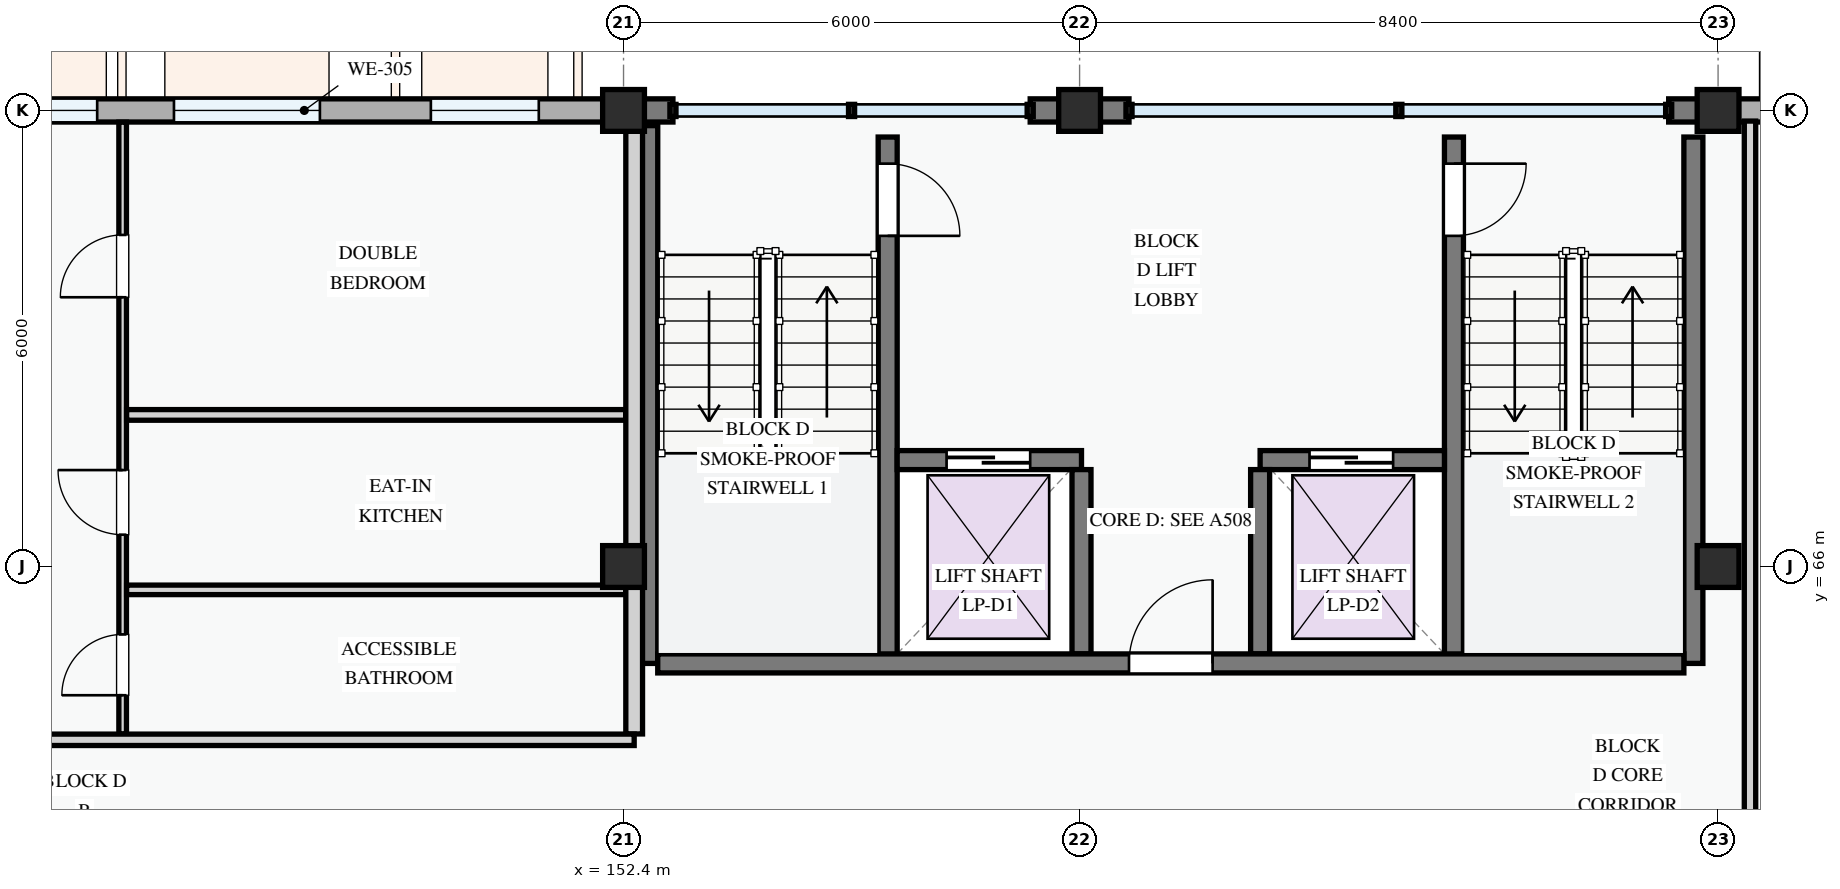
"""IFC4 building model, lengths in metres.
Left out: names, types, materials, properties, quantities, classifications, styles, units other than length and angle.
Written with IfcOpenShell. Run it as: python <this file> out.ifc"""

import sys

from ifc_helpers import new_model, si_unit, direction, frame, frame_2d, origin, origin_2d, place, context, subcontext, project, spatial, rectangle, extrude, element, fill, save


model = new_model("IFC4")
c1 = context("Model", 3, precision=1e-05, world=origin(), true_north=direction((0.0, 1.0)))
c2 = subcontext(c1, "Body", "Model", "MODEL_VIEW")
j1 = project(units=[si_unit("LENGTHUNIT", "METRE"), si_unit("PLANEANGLEUNIT", "RADIAN")], contexts=[c1])
p1 = place(None, origin())
s1 = spatial("IfcSite", under=j1, at=p1, CompositionType="ELEMENT")
p2 = place(p1, origin())
s2 = spatial("IfcBuilding", under=s1, at=p2, CompositionType="ELEMENT")
p3 = place(p2, frame((0.0, 0.0, 14.7)))
s3 = spatial("IfcBuildingStorey", under=s2, at=p3, CompositionType="ELEMENT", Elevation=14.7)
for number, where, z_axis, x_axis in (
    (1, (152.4, 66.0, 0.0), (0.0, 0.0, 1.0), (1.0, 0.0, 0.0)),
    (2, (152.4, 72.0, 0.0), (0.0, 0.0, 1.0), (1.0, 0.0, 0.0)),
    (3, (158.4, 72.0, 0.0), (0.0, 0.0, 1.0), (1.0, 0.0, 0.0)),
    (4, (166.8, 66.0, 0.0), (0.0, 0.0, 1.0), (1.0, 0.0, 0.0)),
    (5, (166.8, 72.0, 0.0), (0.0, 0.0, 1.0), (1.0, 0.0, 0.0)),
):
    element("IfcColumn", number, at=place(p3, frame(where, z_axis=z_axis, x_axis=x_axis)), inside=s3, PredefinedType="COLUMN", context=c2, shape_type="SweptSolid", body=[
        extrude(rectangle(XDim=0.55, YDim=0.55, at=origin_2d()), origin(), (0.0, 0.0, 1.0), 3.3),
    ])
p4 = place(p3, frame((152.4, 72.0, 0.0), z_axis=(0.0, 0.0, 1.0), x_axis=(-1.0, 0.0, 0.0)))
e6 = element("IfcWall", 6, at=p4, inside=s3, PredefinedType="STANDARD", context=c2, shape_type="SweptSolid", body=[
    extrude(rectangle(XDim=8.4, YDim=0.305, at=frame_2d((4.2, 0.0))), origin(), (0.0, 0.0, 1.0), 2.375),
])
p5 = place(p4, frame((1.115, 0.0, 0.78)))
e7 = element("IfcOpeningElement", 7, at=p5, cuts=e6, PredefinedType="OPENING", context=c2, shape_type="SweptSolid", body=[
    extrude(rectangle(XDim=1.42, YDim=1.38, at=frame_2d((0.71, 0.69))), frame((0.0, 0.163, 0.0), z_axis=(0.0, -1.0, 0.0), x_axis=(1.0, 0.0, 0.0)), (0.0, 0.0, 1.0), 0.325),
])
p6 = place(p4, frame((3.995, 0.0, 0.78)))
e8 = element("IfcOpeningElement", 8, at=p6, cuts=e6, PredefinedType="OPENING", context=c2, shape_type="SweptSolid", body=[
    extrude(rectangle(XDim=1.92, YDim=1.44, at=frame_2d((0.96, 0.72))), frame((0.0, 0.163, 0.0), z_axis=(0.0, -1.0, 0.0), x_axis=(1.0, 0.0, 0.0)), (0.0, 0.0, 1.0), 0.325),
])
p7 = place(p4, frame((6.925, 0.0, 0.78)))
e9 = element("IfcOpeningElement", 9, at=p7, cuts=e6, PredefinedType="OPENING", context=c2, shape_type="SweptSolid", body=[
    extrude(rectangle(XDim=0.95, YDim=1.15, at=frame_2d((0.475, 0.575))), frame((0.0, 0.163, 0.0), z_axis=(0.0, -1.0, 0.0), x_axis=(1.0, 0.0, 0.0)), (0.0, 0.0, 1.0), 0.325),
])
p8 = place(p3, frame((174.0, 72.0, 0.0), z_axis=(0.0, 0.0, 1.0), x_axis=(-1.0, 0.0, 0.0)))
e10 = element("IfcWall", 10, at=p8, inside=s3, PredefinedType="STANDARD", context=c2, shape_type="SweptSolid", body=[
    extrude(rectangle(XDim=7.2, YDim=0.305, at=frame_2d((3.6, 0.0))), origin(), (0.0, 0.0, 1.0), 2.375),
])
p9 = place(p8, frame((1.323, 0.0, 0.78)))
e11 = element("IfcOpeningElement", 11, at=p9, cuts=e10, PredefinedType="OPENING", context=c2, shape_type="SweptSolid", body=[
    extrude(rectangle(XDim=1.1, YDim=1.3, at=frame_2d((0.55, 0.65))), frame((0.0, 0.163, 0.0), z_axis=(0.0, -1.0, 0.0), x_axis=(1.0, 0.0, 0.0)), (0.0, 0.0, 1.0), 0.325),
])
p10 = place(p8, frame((4.573, 0.0, 0.78)))
e12 = element("IfcOpeningElement", 12, at=p10, cuts=e10, PredefinedType="OPENING", context=c2, shape_type="SweptSolid", body=[
    extrude(rectangle(XDim=1.05, YDim=1.2, at=frame_2d((0.525, 0.6))), frame((0.0, 0.163, 0.0), z_axis=(0.0, -1.0, 0.0), x_axis=(1.0, 0.0, 0.0)), (0.0, 0.0, 1.0), 0.325),
])
for number, where, z_axis, x_axis in (
    (13, (166.8, 72.0, 0.0), (0.0, 0.0, 1.0), (-1.0, 0.0, 0.0)),
    (14, (159.05, 72.0, 0.0), (0.0, 0.0, 1.0), (-1.0, 0.0, 0.0)),
):
    element("IfcWall", number, at=place(p3, frame(where, z_axis=z_axis, x_axis=x_axis)), inside=s3, PredefinedType="STANDARD", context=c2, shape_type="SweptSolid", body=[
        extrude(rectangle(XDim=0.65, YDim=0.305, at=frame_2d((0.325, 0.0))), origin(), (0.0, 0.0, 1.0), 3.04),
    ])
p11 = place(p3, frame((158.4, 72.0, 0.0), z_axis=(0.0, 0.0, 1.0), x_axis=(-1.0, 0.0, 0.0)))
e15 = element("IfcWall", 15, at=p11, inside=s3, PredefinedType="STANDARD", context=c2, shape_type="SweptSolid", body=[
    extrude(rectangle(XDim=0.65, YDim=0.305, at=frame_2d((0.325, 0.0))), origin(), (0.0, 0.0, 1.0), 3.04),
])
p12 = place(p3, frame((153.05, 72.0, 0.0), z_axis=(0.0, 0.0, 1.0), x_axis=(-1.0, 0.0, 0.0)))
e16 = element("IfcWall", 16, at=p12, inside=s3, PredefinedType="STANDARD", context=c2, shape_type="SweptSolid", body=[
    extrude(rectangle(XDim=0.65, YDim=0.305, at=frame_2d((0.325, 0.0))), origin(), (0.0, 0.0, 1.0), 3.04),
])
p13 = place(p3, frame((155.875, 71.65, 0.0), z_axis=(0.0, 0.0, 1.0), x_axis=(0.0, -1.0, 0.0)))
e17 = element("IfcWall", 17, at=p13, inside=s3, PredefinedType="SHEAR", context=c2, shape_type="SweptSolid", body=[
    extrude(rectangle(XDim=6.925, YDim=0.25, at=frame_2d((3.462, 0.0))), origin(), (0.0, 0.0, 1.0), 3.0),
])
p14 = place(p13, frame((0.35, 0.0, 0.0)))
e18 = element("IfcOpeningElement", 18, at=p14, cuts=e17, PredefinedType="OPENING", context=c2, shape_type="SweptSolid", body=[
    extrude(rectangle(XDim=0.95, YDim=2.1, at=frame_2d((0.475, 1.05))), frame((0.0, 0.135, 0.0), z_axis=(0.0, -1.0, 0.0), x_axis=(1.0, 0.0, 0.0)), (0.0, 0.0, 1.0), 0.27),
])
p15 = place(p3, frame((152.725, 71.8, 0.0), z_axis=(0.0, 0.0, 1.0), x_axis=(0.0, -1.0, 0.0)))
e19 = element("IfcWall", 19, at=p15, inside=s3, PredefinedType="SHEAR", context=c2, shape_type="SweptSolid", body=[
    extrude(rectangle(XDim=7.075, YDim=0.25, at=frame_2d((3.538, 0.0))), origin(), (0.0, 0.0, 1.0), 3.0),
])
p16 = place(p3, frame((166.475, 71.65, 0.0), z_axis=(0.0, 0.0, 1.0), x_axis=(0.0, -1.0, 0.0)))
e20 = element("IfcWall", 20, at=p16, inside=s3, PredefinedType="SHEAR", context=c2, shape_type="SweptSolid", body=[
    extrude(rectangle(XDim=6.925, YDim=0.25, at=frame_2d((3.462, 0.0))), origin(), (0.0, 0.0, 1.0), 3.0),
])
p17 = place(p3, frame((163.325, 71.65, 0.0), z_axis=(0.0, 0.0, 1.0), x_axis=(0.0, -1.0, 0.0)))
e21 = element("IfcWall", 21, at=p17, inside=s3, PredefinedType="SHEAR", context=c2, shape_type="SweptSolid", body=[
    extrude(rectangle(XDim=6.925, YDim=0.25, at=frame_2d((3.462, 0.0))), origin(), (0.0, 0.0, 1.0), 3.0),
])
p18 = place(p17, frame((0.35, 0.0, 0.0)))
e22 = element("IfcOpeningElement", 22, at=p18, cuts=e21, PredefinedType="OPENING", context=c2, shape_type="SweptSolid", body=[
    extrude(rectangle(XDim=0.95, YDim=2.1, at=frame_2d((0.475, 1.05))), frame((0.0, 0.135, 0.0), z_axis=(0.0, -1.0, 0.0), x_axis=(1.0, 0.0, 0.0)), (0.0, 0.0, 1.0), 0.27),
])
p19 = place(p3, frame((156.0, 67.4, 0.0), z_axis=(0.0, 0.0, 1.0), x_axis=(1.0, 0.0, 0.0)))
e23 = element("IfcWall", 23, at=p19, inside=s3, PredefinedType="SHEAR", context=c2, shape_type="SweptSolid", body=[
    extrude(rectangle(XDim=2.425, YDim=0.25, at=frame_2d((1.212, 0.0))), origin(), (0.0, 0.0, 1.0), 3.0),
])
p20 = place(p19, frame((0.65, 0.0, 0.0)))
e24 = element("IfcOpeningElement", 24, at=p20, cuts=e23, PredefinedType="OPENING", context=c2, shape_type="SweptSolid", body=[
    extrude(rectangle(XDim=1.1, YDim=2.15, at=frame_2d((0.55, 1.075))), frame((0.0, 0.135, 0.0), z_axis=(0.0, -1.0, 0.0), x_axis=(1.0, 0.0, 0.0)), (0.0, 0.0, 1.0), 0.27),
])
p21 = place(p3, frame((160.775, 67.4, 0.0), z_axis=(0.0, 0.0, 1.0), x_axis=(1.0, 0.0, 0.0)))
e25 = element("IfcWall", 25, at=p21, inside=s3, PredefinedType="SHEAR", context=c2, shape_type="SweptSolid", body=[
    extrude(rectangle(XDim=2.425, YDim=0.25, at=frame_2d((1.212, 0.0))), origin(), (0.0, 0.0, 1.0), 3.0),
])
p22 = place(p21, frame((0.65, 0.0, 0.0)))
e26 = element("IfcOpeningElement", 26, at=p22, cuts=e25, PredefinedType="OPENING", context=c2, shape_type="SweptSolid", body=[
    extrude(rectangle(XDim=1.1, YDim=2.15, at=frame_2d((0.55, 1.075))), frame((0.0, 0.135, 0.0), z_axis=(0.0, -1.0, 0.0), x_axis=(1.0, 0.0, 0.0)), (0.0, 0.0, 1.0), 0.27),
])
for number, where, z_axis, x_axis in (
    (27, (158.425, 67.275, 0.0), (0.0, 0.0, 1.0), (0.0, -1.0, 0.0)),
    (28, (160.775, 67.275, 0.0), (0.0, 0.0, 1.0), (0.0, -1.0, 0.0)),
):
    element("IfcWall", number, at=place(p3, frame(where, z_axis=z_axis, x_axis=x_axis)), inside=s3, PredefinedType="SHEAR", context=c2, shape_type="SweptSolid", body=[
        extrude(rectangle(XDim=2.425, YDim=0.25, at=frame_2d((1.212, 0.0))), origin(), (0.0, 0.0, 1.0), 3.0),
    ])
p23 = place(p3, frame((152.85, 64.725, 0.0), z_axis=(0.0, 0.0, 1.0), x_axis=(1.0, 0.0, 0.0)))
e29 = element("IfcWall", 29, at=p23, inside=s3, PredefinedType="SHEAR", context=c2, shape_type="SweptSolid", body=[
    extrude(rectangle(XDim=13.5, YDim=0.25, at=frame_2d((6.75, 0.0))), origin(), (0.0, 0.0, 1.0), 3.0),
])
p24 = place(p23, frame((6.2, 0.0, 0.0)))
e30 = element("IfcOpeningElement", 30, at=p24, cuts=e29, PredefinedType="OPENING", context=c2, shape_type="SweptSolid", body=[
    extrude(rectangle(XDim=1.1, YDim=2.15, at=frame_2d((0.55, 1.075))), frame((0.0, 0.135, 0.0), z_axis=(0.0, -1.0, 0.0), x_axis=(1.0, 0.0, 0.0)), (0.0, 0.0, 1.0), 0.27),
])
p25 = place(p3, frame((167.22, 57.834, 0.0), z_axis=(0.0, 0.0, 1.0), x_axis=(0.0, 1.0, 0.0)))
e31 = element("IfcWall", 31, at=p25, inside=s3, PredefinedType="PARTITIONING", context=c2, shape_type="SweptSolid", body=[
    extrude(rectangle(XDim=14.026, YDim=0.15, at=frame_2d((7.013, 0.0))), origin(), (0.0, 0.0, 1.0), 2.425),
])
p26 = place(p25, frame((2.456, 0.0, 0.0)))
e32 = element("IfcOpeningElement", 32, at=p26, cuts=e31, PredefinedType="OPENING", context=c2, shape_type="SweptSolid", body=[
    extrude(rectangle(XDim=0.92, YDim=2.1, at=frame_2d((0.46, 1.05))), frame((0.0, 0.085, 0.0), z_axis=(0.0, -1.0, 0.0), x_axis=(1.0, 0.0, 0.0)), (0.0, 0.0, 1.0), 0.17),
])
p27 = place(p3, frame((145.81, 63.797, 0.0), z_axis=(0.0, 0.0, 1.0), x_axis=(0.0, 1.0, 0.0)))
e33 = element("IfcWall", 33, at=p27, inside=s3, PredefinedType="PARTITIONING", context=c2, shape_type="SweptSolid", body=[
    extrude(rectangle(XDim=8.048, YDim=0.1, at=frame_2d((4.024, 0.0))), origin(), (0.0, 0.0, 1.0), 3.0),
])
p28 = place(p27, frame((0.51, 0.0, 0.0)))
e34 = element("IfcOpeningElement", 34, at=p28, cuts=e33, PredefinedType="OPENING", context=c2, shape_type="SweptSolid", body=[
    extrude(rectangle(XDim=0.8, YDim=2.1, at=frame_2d((0.4, 1.05))), frame((0.0, 0.06, 0.0), z_axis=(0.0, -1.0, 0.0), x_axis=(1.0, 0.0, 0.0)), (0.0, 0.0, 1.0), 0.12),
])
p29 = place(p27, frame((2.622, 0.0, 0.0)))
e35 = element("IfcOpeningElement", 35, at=p29, cuts=e33, PredefinedType="OPENING", context=c2, shape_type="SweptSolid", body=[
    extrude(rectangle(XDim=0.85, YDim=2.1, at=frame_2d((0.425, 1.05))), frame((0.0, 0.06, 0.0), z_axis=(0.0, -1.0, 0.0), x_axis=(1.0, 0.0, 0.0)), (0.0, 0.0, 1.0), 0.12),
])
p30 = place(p27, frame((5.745, 0.0, 0.0)))
e36 = element("IfcOpeningElement", 36, at=p30, cuts=e33, PredefinedType="OPENING", context=c2, shape_type="SweptSolid", body=[
    extrude(rectangle(XDim=0.82, YDim=2.08, at=frame_2d((0.41, 1.04))), frame((0.0, 0.06, 0.0), z_axis=(0.0, -1.0, 0.0), x_axis=(1.0, 0.0, 0.0)), (0.0, 0.0, 1.0), 0.12),
])
p31 = place(p3, frame((145.862, 67.994, 0.0), z_axis=(0.0, 0.0, 1.0), x_axis=(1.0, 0.0, 0.0)))
e37 = element("IfcWall", 37, at=p31, inside=s3, PredefinedType="PARTITIONING", context=c2, shape_type="SweptSolid", body=[
    extrude(rectangle(XDim=6.566, YDim=0.14, at=frame_2d((3.283, 0.0))), origin(), (0.0, 0.0, 1.0), 3.0),
])
p32 = place(p3, frame((145.862, 65.693, 0.0), z_axis=(0.0, 0.0, 1.0), x_axis=(1.0, 0.0, 0.0)))
e38 = element("IfcWall", 38, at=p32, inside=s3, PredefinedType="PARTITIONING", context=c2, shape_type="SweptSolid", body=[
    extrude(rectangle(XDim=6.566, YDim=0.125, at=frame_2d((3.283, 0.0))), origin(), (0.0, 0.0, 1.0), 2.375),
])
p33 = place(p3, frame((152.54, 63.797, 0.0), z_axis=(0.0, 0.0, 1.0), x_axis=(0.0, 1.0, 0.0)))
e39 = element("IfcWall", 39, at=p33, inside=s3, PredefinedType="PARTITIONING", context=c2, shape_type="SweptSolid", body=[
    extrude(rectangle(XDim=8.048, YDim=0.22, at=frame_2d((4.024, 0.0))), origin(), (0.0, 0.0, 1.0), 2.425),
])
p34 = place(p3, frame((138.155, 63.72, 0.0), z_axis=(0.0, 0.0, 1.0), x_axis=(1.0, 0.0, 0.0)))
e40 = element("IfcWall", 40, at=p34, inside=s3, PredefinedType="PARTITIONING", context=c2, shape_type="SweptSolid", body=[
    extrude(rectangle(XDim=14.385, YDim=0.15, at=frame_2d((7.193, 0.0))), origin(), (0.0, 0.0, 1.0), 3.0),
])
p35 = place(p34, frame((2.318, 0.0, 0.0)))
e41 = element("IfcOpeningElement", 41, at=p35, cuts=e40, PredefinedType="OPENING", context=c2, shape_type="SweptSolid", body=[
    extrude(rectangle(XDim=0.92, YDim=2.1, at=frame_2d((0.46, 1.05))), frame((0.0, 0.085, 0.0), z_axis=(0.0, -1.0, 0.0), x_axis=(1.0, 0.0, 0.0)), (0.0, 0.0, 1.0), 0.17),
])
p36 = place(p5, origin())
e42 = element("IfcWindow", 42, at=p36, inside=s3, PartitioningType="SINGLE_PANEL", PredefinedType="WINDOW", context=c2, shape_type="SweptSolid", body=[
    extrude(rectangle(XDim=1.42, YDim=1.38, at=frame_2d((0.71, 0.69))), frame((0.0, 0.03, 0.0), z_axis=(0.0, -1.0, 0.0), x_axis=(1.0, 0.0, 0.0)), (0.0, 0.0, 1.0), 0.06),
])
fill(e7, e42)
p37 = place(p6, origin())
e43 = element("IfcWindow", 43, at=p37, inside=s3, PartitioningType="DOUBLE_PANEL_VERTICAL", PredefinedType="WINDOW", context=c2, shape_type="SweptSolid", body=[
    extrude(rectangle(XDim=1.92, YDim=1.44, at=frame_2d((0.96, 0.72))), frame((0.0, 0.03, 0.0), z_axis=(0.0, -1.0, 0.0), x_axis=(1.0, 0.0, 0.0)), (0.0, 0.0, 1.0), 0.06),
])
fill(e8, e43)
p38 = place(p7, origin())
e44 = element("IfcWindow", 44, at=p38, inside=s3, PartitioningType="SINGLE_PANEL", PredefinedType="WINDOW", context=c2, shape_type="SweptSolid", body=[
    extrude(rectangle(XDim=0.95, YDim=1.15, at=frame_2d((0.475, 0.575))), frame((0.0, 0.03, 0.0), z_axis=(0.0, -1.0, 0.0), x_axis=(1.0, 0.0, 0.0)), (0.0, 0.0, 1.0), 0.06),
])
fill(e9, e44)
p39 = place(p14, origin())
e45 = element("IfcDoor", 45, at=p39, inside=s3, OperationType="SINGLE_SWING_RIGHT", PredefinedType="DOOR", context=c2, shape_type="SweptSolid", body=[
    extrude(rectangle(XDim=0.95, YDim=2.1, at=frame_2d((0.475, 1.05))), frame((0.0, 0.025, 0.0), z_axis=(0.0, -1.0, 0.0), x_axis=(1.0, 0.0, 0.0)), (0.0, 0.0, 1.0), 0.05),
])
fill(e18, e45)
p40 = place(p18, origin())
e46 = element("IfcDoor", 46, at=p40, inside=s3, OperationType="SINGLE_SWING_LEFT", PredefinedType="DOOR", context=c2, shape_type="SweptSolid", body=[
    extrude(rectangle(XDim=0.95, YDim=2.1, at=frame_2d((0.475, 1.05))), frame((0.0, 0.025, 0.0), z_axis=(0.0, -1.0, 0.0), x_axis=(1.0, 0.0, 0.0)), (0.0, 0.0, 1.0), 0.05),
])
fill(e22, e46)
p41 = place(p20, origin())
e47 = element("IfcDoor", 47, at=p41, inside=s3, OperationType="SLIDING_TO_LEFT", PredefinedType="DOOR", context=c2, shape_type="SweptSolid", body=[
    extrude(rectangle(XDim=1.1, YDim=2.15, at=frame_2d((0.55, 1.075))), frame((0.0, 0.025, 0.0), z_axis=(0.0, -1.0, 0.0), x_axis=(1.0, 0.0, 0.0)), (0.0, 0.0, 1.0), 0.05),
])
fill(e24, e47)
p42 = place(p22, origin())
e48 = element("IfcDoor", 48, at=p42, inside=s3, OperationType="SLIDING_TO_LEFT", PredefinedType="DOOR", context=c2, shape_type="SweptSolid", body=[
    extrude(rectangle(XDim=1.1, YDim=2.15, at=frame_2d((0.55, 1.075))), frame((0.0, 0.025, 0.0), z_axis=(0.0, -1.0, 0.0), x_axis=(1.0, 0.0, 0.0)), (0.0, 0.0, 1.0), 0.05),
])
fill(e26, e48)
p43 = place(p24, origin())
e49 = element("IfcDoor", 49, at=p43, inside=s3, OperationType="SINGLE_SWING_RIGHT", PredefinedType="DOOR", context=c2, shape_type="SweptSolid", body=[
    extrude(rectangle(XDim=1.1, YDim=2.15, at=frame_2d((0.55, 1.075))), frame((0.0, 0.025, 0.0), z_axis=(0.0, -1.0, 0.0), x_axis=(1.0, 0.0, 0.0)), (0.0, 0.0, 1.0), 0.05),
])
fill(e30, e49)
p44 = place(p28, origin())
e50 = element("IfcDoor", 50, at=p44, inside=s3, OperationType="SINGLE_SWING_LEFT", PredefinedType="DOOR", context=c2, shape_type="SweptSolid", body=[
    extrude(rectangle(XDim=0.8, YDim=2.1, at=frame_2d((0.4, 1.05))), frame((0.0, 0.025, 0.0), z_axis=(0.0, -1.0, 0.0), x_axis=(1.0, 0.0, 0.0)), (0.0, 0.0, 1.0), 0.05),
])
fill(e34, e50)
p45 = place(p29, origin())
e51 = element("IfcDoor", 51, at=p45, inside=s3, OperationType="SINGLE_SWING_RIGHT", PredefinedType="DOOR", context=c2, shape_type="SweptSolid", body=[
    extrude(rectangle(XDim=0.85, YDim=2.1, at=frame_2d((0.425, 1.05))), frame((0.0, 0.025, 0.0), z_axis=(0.0, -1.0, 0.0), x_axis=(1.0, 0.0, 0.0)), (0.0, 0.0, 1.0), 0.05),
])
fill(e35, e51)
p46 = place(p30, origin())
e52 = element("IfcDoor", 52, at=p46, inside=s3, OperationType="SINGLE_SWING_LEFT", PredefinedType="DOOR", context=c2, shape_type="SweptSolid", body=[
    extrude(rectangle(XDim=0.82, YDim=2.08, at=frame_2d((0.41, 1.04))), frame((0.0, 0.025, 0.0), z_axis=(0.0, -1.0, 0.0), x_axis=(1.0, 0.0, 0.0)), (0.0, 0.0, 1.0), 0.05),
])
fill(e36, e52)
save(model, sys.argv[1])
